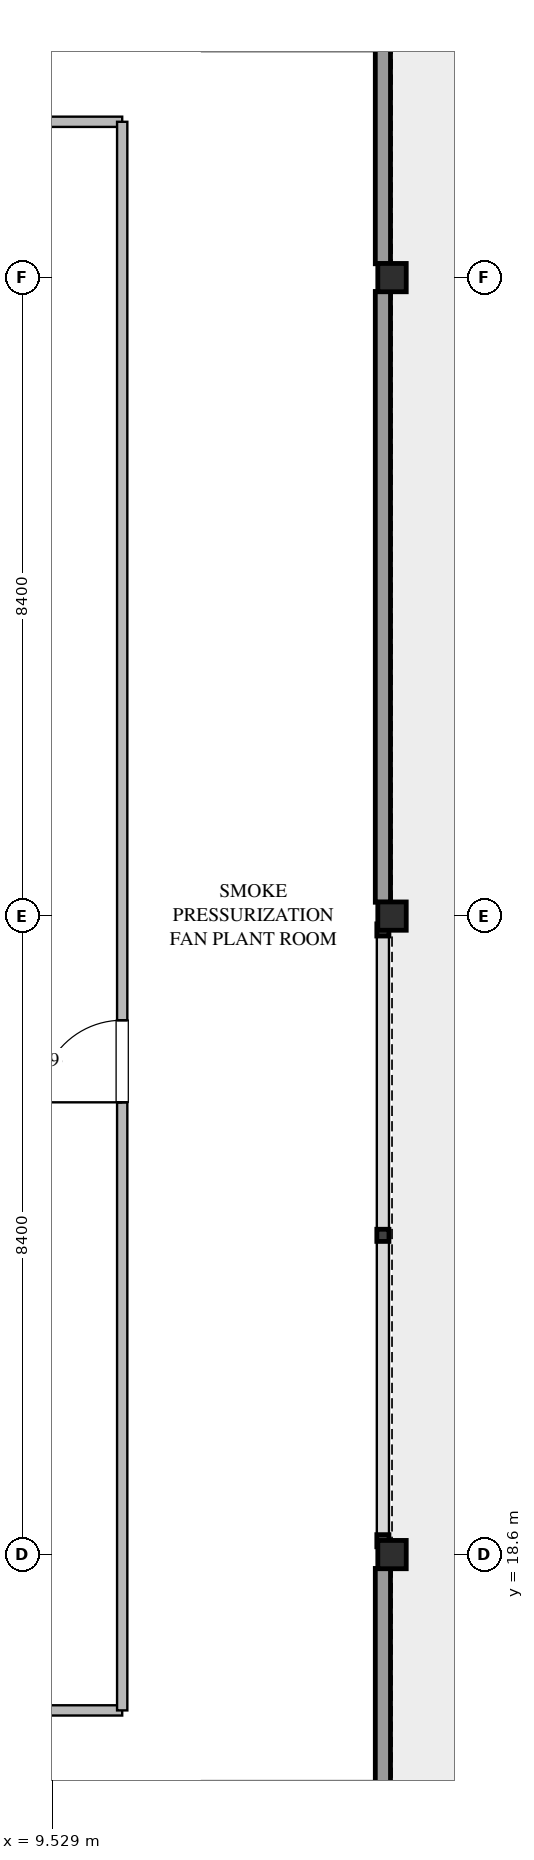
"""IFC4 building model, lengths in metres.
Left out: names, types, materials, properties, quantities, classifications, styles, units other than length and angle.
Written with IfcOpenShell. Run it as: python <this file> out.ifc"""

import sys

from ifc_helpers import new_model, si_unit, direction, frame, frame_2d, origin, origin_2d, place, context, subcontext, project, spatial, rectangle, i_section, extrude, element, fill, save


model = new_model("IFC4")
c1 = context("Model", 3, precision=1e-05, world=origin(), true_north=direction((0.0, 1.0)))
c2 = subcontext(c1, "Body", "Model", "MODEL_VIEW")
j1 = project(units=[si_unit("LENGTHUNIT", "METRE"), si_unit("PLANEANGLEUNIT", "RADIAN")], contexts=[c1])
p1 = place(None, origin())
s1 = spatial("IfcSite", under=j1, at=p1, CompositionType="ELEMENT")
p2 = place(p1, origin())
s2 = spatial("IfcBuilding", under=s1, at=p2, CompositionType="ELEMENT")
p3 = place(p2, frame((0.0, 0.0, 311.4)))
s3 = spatial("IfcBuildingStorey", under=s2, at=p3, CompositionType="ELEMENT", Elevation=311.4)
for number, where, z_axis, x_axis in (
    (1, (14.0, 18.6, -0.32), (0.0, 0.0, 1.0), (1.0, 0.0, 0.0)),
    (2, (14.0, 27.0, -0.32), (0.0, 0.0, 1.0), (1.0, 0.0, 0.0)),
    (3, (14.0, 35.4, -0.32), (0.0, 0.0, 1.0), (1.0, 0.0, 0.0)),
):
    element("IfcColumn", number, at=place(p3, frame(where, z_axis=z_axis, x_axis=x_axis)), inside=s3, PredefinedType="COLUMN", context=c2, shape_type="SweptSolid", body=[
        extrude(i_section(OverallWidth=0.374, OverallDepth=0.372, WebThickness=0.016, FlangeThickness=0.026, FilletRadius=0.025, at=origin_2d()), origin(), (0.0, 0.0, 1.0), 4.317),
    ])
p4 = place(p3, frame((-10.45, 16.55, 0.0), z_axis=(0.0, 0.0, 1.0), x_axis=(1.0, 0.0, 0.0)))
e4 = element("IfcWall", 4, at=p4, inside=s3, PredefinedType="PARTITIONING", context=c2, shape_type="SweptSolid", body=[
    extrude(rectangle(XDim=20.9, YDim=0.135, at=frame_2d((10.45, 0.0))), origin(), (0.0, 0.0, 1.0), 3.68),
])
p5 = place(p4, frame((3.0, 0.0, 0.0)))
e5 = element("IfcOpeningElement", 5, at=p5, cuts=e4, PredefinedType="OPENING", context=c2, shape_type="SweptSolid", body=[
    extrude(rectangle(XDim=1.08, YDim=2.04, at=frame_2d((0.54, 1.02))), frame((0.0, 0.077, 0.0), z_axis=(0.0, -1.0, 0.0), x_axis=(1.0, 0.0, 0.0)), (0.0, 0.0, 1.0), 0.155),
])
p6 = place(p4, frame((15.0, 0.0, 0.0)))
e6 = element("IfcOpeningElement", 6, at=p6, cuts=e4, PredefinedType="OPENING", context=c2, shape_type="SweptSolid", body=[
    extrude(rectangle(XDim=1.08, YDim=2.04, at=frame_2d((0.54, 1.02))), frame((0.0, 0.077, 0.0), z_axis=(0.0, -1.0, 0.0), x_axis=(1.0, 0.0, 0.0)), (0.0, 0.0, 1.0), 0.155),
])
p7 = place(p3, frame((-10.45, 37.45, 0.0), z_axis=(0.0, 0.0, 1.0), x_axis=(1.0, 0.0, 0.0)))
e7 = element("IfcWall", 7, at=p7, inside=s3, PredefinedType="PARTITIONING", context=c2, shape_type="SweptSolid", body=[
    extrude(rectangle(XDim=20.9, YDim=0.135, at=frame_2d((10.45, 0.0))), origin(), (0.0, 0.0, 1.0), 3.68),
])
p8 = place(p7, frame((3.0, 0.0, 0.0)))
e8 = element("IfcOpeningElement", 8, at=p8, cuts=e7, PredefinedType="OPENING", context=c2, shape_type="SweptSolid", body=[
    extrude(rectangle(XDim=1.08, YDim=2.04, at=frame_2d((0.54, 1.02))), frame((0.0, 0.077, 0.0), z_axis=(0.0, -1.0, 0.0), x_axis=(1.0, 0.0, 0.0)), (0.0, 0.0, 1.0), 0.155),
])
p9 = place(p7, frame((15.0, 0.0, 0.0)))
e9 = element("IfcOpeningElement", 9, at=p9, cuts=e7, PredefinedType="OPENING", context=c2, shape_type="SweptSolid", body=[
    extrude(rectangle(XDim=1.08, YDim=2.04, at=frame_2d((0.54, 1.02))), frame((0.0, 0.077, 0.0), z_axis=(0.0, -1.0, 0.0), x_axis=(1.0, 0.0, 0.0)), (0.0, 0.0, 1.0), 0.155),
])
p10 = place(p3, frame((10.45, 16.55, 0.0), z_axis=(0.0, 0.0, 1.0), x_axis=(0.0, 1.0, 0.0)))
e10 = element("IfcWall", 10, at=p10, inside=s3, PredefinedType="PARTITIONING", context=c2, shape_type="SweptSolid", body=[
    extrude(rectangle(XDim=20.9, YDim=0.135, at=frame_2d((10.45, 0.0))), origin(), (0.0, 0.0, 1.0), 3.68),
])
p11 = place(p10, frame((8.0, 0.0, 0.0)))
e11 = element("IfcOpeningElement", 11, at=p11, cuts=e10, PredefinedType="OPENING", context=c2, shape_type="SweptSolid", body=[
    extrude(rectangle(XDim=1.08, YDim=2.04, at=frame_2d((0.54, 1.02))), frame((0.0, 0.077, 0.0), z_axis=(0.0, -1.0, 0.0), x_axis=(1.0, 0.0, 0.0)), (0.0, 0.0, 1.0), 0.155),
])
p12 = place(p11, origin())
e12 = element("IfcDoor", 12, at=p12, inside=s3, OperationType="SINGLE_SWING_LEFT", PredefinedType="DOOR", context=c2, shape_type="SweptSolid", body=[
    extrude(rectangle(XDim=1.08, YDim=2.04, at=frame_2d((0.54, 1.02))), frame((0.0, 0.025, 0.0), z_axis=(0.0, -1.0, 0.0), x_axis=(1.0, 0.0, 0.0)), (0.0, 0.0, 1.0), 0.05),
])
fill(e11, e12)
save(model, sys.argv[1])
